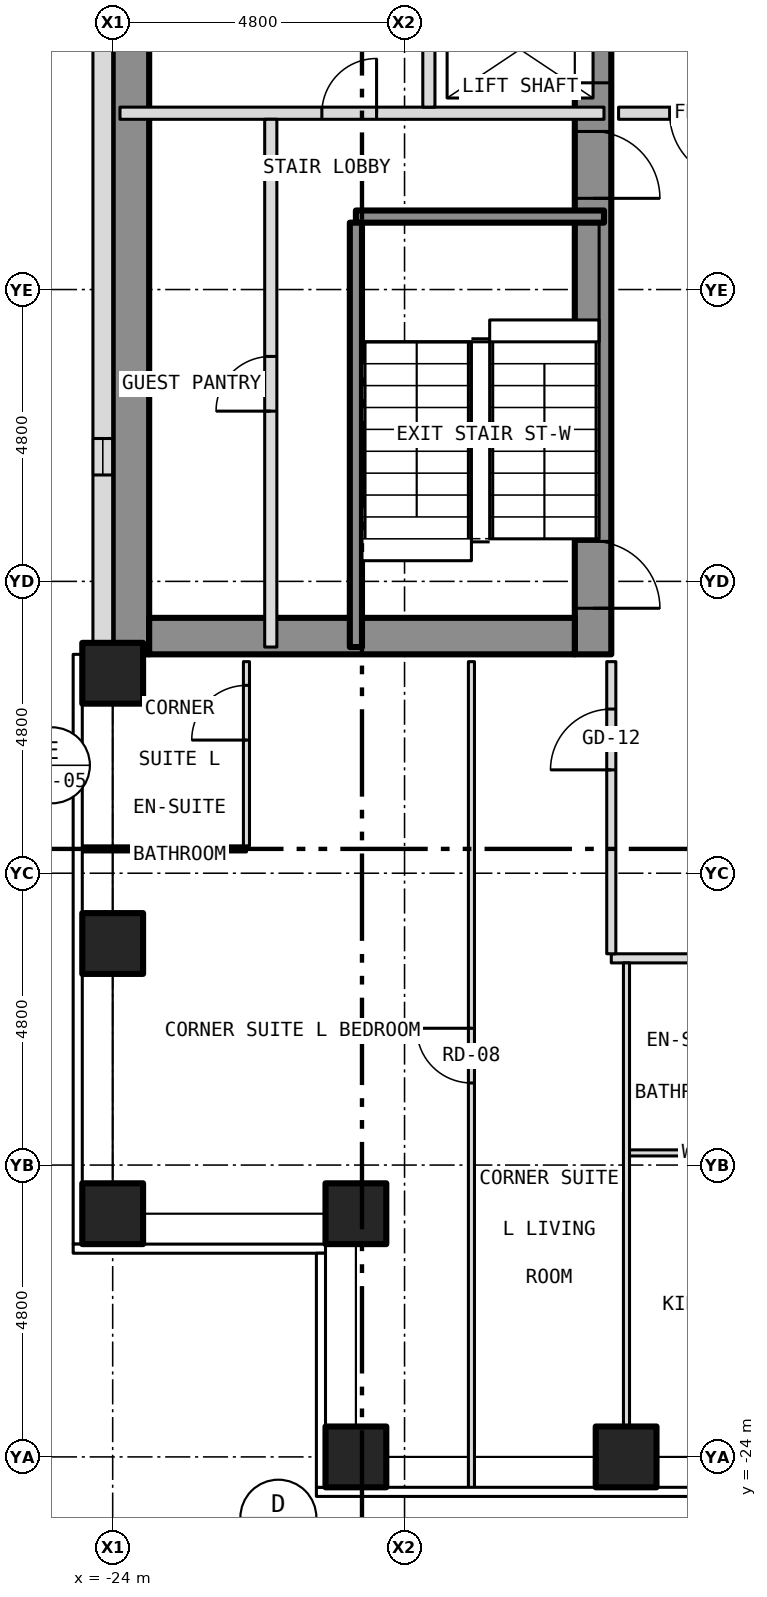
"""IFC4 building model, lengths in metres.
Left out: names, types, materials, properties, quantities, classifications, styles, units other than length and angle.
Written with IfcOpenShell. Run it as: python <this file> out.ifc"""

import sys

from ifc_helpers import new_model, si_unit, direction, frame, frame_2d, origin, origin_2d, place, context, subcontext, project, spatial, rectangle, hollow_rectangle, extrude, element, fill, save


model = new_model("IFC4")
c1 = context("Model", 3, precision=1e-05, world=origin(), true_north=direction((0.0, 1.0)))
c2 = subcontext(c1, "Body", "Model", "MODEL_VIEW")
j1 = project(units=[si_unit("LENGTHUNIT", "METRE"), si_unit("PLANEANGLEUNIT", "RADIAN")], contexts=[c1])
p1 = place(None, origin())
s1 = spatial("IfcSite", under=j1, at=p1, CompositionType="ELEMENT")
p2 = place(p1, origin())
s2 = spatial("IfcBuilding", under=s1, at=p2, CompositionType="ELEMENT")
p3 = place(p2, frame((0.0, 0.0, 49.5)))
s3 = spatial("IfcBuildingStorey", under=s2, at=p3, CompositionType="ELEMENT", Elevation=49.5)
for number, where, z_axis, x_axis in (
    (1, (-20.0, -24.0, -0.15), (0.0, 0.0, 1.0), (1.0, 0.0, 0.0)),
    (2, (-15.556, -24.0, -0.15), (0.0, 0.0, 1.0), (1.0, 0.0, 0.0)),
    (3, (-24.0, -20.0, -0.15), (0.0, 0.0, 1.0), (1.0, 0.0, 0.0)),
    (4, (-24.0, -15.556, -0.15), (0.0, 0.0, 1.0), (1.0, 0.0, 0.0)),
    (5, (-24.0, -11.111, -0.15), (0.0, 0.0, 1.0), (1.0, 0.0, 0.0)),
    (6, (-20.0, -20.0, -0.15), (0.0, 0.0, 1.0), (1.0, 0.0, 0.0)),
):
    element("IfcColumn", number, at=place(p3, frame(where, z_axis=z_axis, x_axis=x_axis)), inside=s3, PredefinedType="COLUMN", context=c2, shape_type="SweptSolid", body=[
        extrude(hollow_rectangle(XDim=1.0, YDim=1.0, WallThickness=0.06, at=origin_2d()), origin(), (0.0, 0.0, 1.0), 3.5),
    ])
p4 = place(p3, frame((-16.1, -10.8, 0.0), z_axis=(0.0, 0.0, 1.0), x_axis=(0.0, 1.0, 0.0)))
e7 = element("IfcWall", 7, at=p4, inside=s3, PredefinedType="SHEAR", context=c2, shape_type="SweptSolid", body=[
    extrude(rectangle(XDim=21.6, YDim=0.6, at=frame_2d((10.8, 0.0))), origin(), (0.0, 0.0, 1.0), 3.25),
])
p5 = place(p4, frame((9.4, 0.0, 0.0)))
e8 = element("IfcOpeningElement", 8, at=p5, cuts=e7, PredefinedType="OPENING", context=c2, shape_type="SweptSolid", body=[
    extrude(rectangle(XDim=1.1, YDim=2.1, at=frame_2d((0.55, 1.05))), frame((0.0, 0.312, 0.0), z_axis=(0.0, -1.0, 0.0), x_axis=(1.0, 0.0, 0.0)), (0.0, 0.0, 1.0), 0.624),
])
p6 = place(p4, frame((11.5, 0.0, 0.0)))
e9 = element("IfcOpeningElement", 9, at=p6, cuts=e7, PredefinedType="OPENING", context=c2, shape_type="SweptSolid", body=[
    extrude(rectangle(XDim=1.1, YDim=2.1, at=frame_2d((0.55, 1.05))), frame((0.0, 0.312, 0.0), z_axis=(0.0, -1.0, 0.0), x_axis=(1.0, 0.0, 0.0)), (0.0, 0.0, 1.0), 0.624),
])
p7 = place(p4, frame((13.6, 0.0, 0.0)))
e10 = element("IfcOpeningElement", 10, at=p7, cuts=e7, PredefinedType="OPENING", context=c2, shape_type="SweptSolid", body=[
    extrude(rectangle(XDim=1.1, YDim=2.1, at=frame_2d((0.55, 1.05))), frame((0.0, 0.312, 0.0), z_axis=(0.0, -1.0, 0.0), x_axis=(1.0, 0.0, 0.0)), (0.0, 0.0, 1.0), 0.624),
])
p8 = place(p4, frame((15.7, 0.0, 0.0)))
e11 = element("IfcOpeningElement", 11, at=p8, cuts=e7, PredefinedType="OPENING", context=c2, shape_type="SweptSolid", body=[
    extrude(rectangle(XDim=1.1, YDim=2.1, at=frame_2d((0.55, 1.05))), frame((0.0, 0.312, 0.0), z_axis=(0.0, -1.0, 0.0), x_axis=(1.0, 0.0, 0.0)), (0.0, 0.0, 1.0), 0.624),
])
p9 = place(p4, frame((17.8, 0.0, 0.0)))
e12 = element("IfcOpeningElement", 12, at=p9, cuts=e7, PredefinedType="OPENING", context=c2, shape_type="SweptSolid", body=[
    extrude(rectangle(XDim=1.1, YDim=2.1, at=frame_2d((0.55, 1.05))), frame((0.0, 0.312, 0.0), z_axis=(0.0, -1.0, 0.0), x_axis=(1.0, 0.0, 0.0)), (0.0, 0.0, 1.0), 0.624),
])
p10 = place(p4, frame((0.758, 0.0, 0.0)))
e13 = element("IfcOpeningElement", 13, at=p10, cuts=e7, PredefinedType="OPENING", context=c2, shape_type="SweptSolid", body=[
    extrude(rectangle(XDim=1.1, YDim=2.1, at=frame_2d((0.55, 1.05))), frame((0.0, 0.312, 0.0), z_axis=(0.0, -1.0, 0.0), x_axis=(1.0, 0.0, 0.0)), (0.0, 0.0, 1.0), 0.624),
])
p11 = place(p4, frame((7.5, 0.0, 0.0)))
e14 = element("IfcOpeningElement", 14, at=p11, cuts=e7, PredefinedType="OPENING", context=c2, shape_type="SweptSolid", body=[
    extrude(rectangle(XDim=1.1, YDim=2.1, at=frame_2d((0.55, 1.05))), frame((0.0, 0.312, 0.0), z_axis=(0.0, -1.0, 0.0), x_axis=(1.0, 0.0, 0.0)), (0.0, 0.0, 1.0), 0.624),
])
p12 = place(p3, frame((-23.7, -10.8, 0.0), z_axis=(0.0, 0.0, 1.0), x_axis=(0.0, 1.0, 0.0)))
e15 = element("IfcWall", 15, at=p12, inside=s3, PredefinedType="SHEAR", context=c2, shape_type="SweptSolid", body=[
    extrude(rectangle(XDim=21.6, YDim=0.6, at=frame_2d((10.8, 0.0))), origin(), (0.0, 0.0, 1.0), 3.25),
])
p13 = place(p3, frame((-23.4, -10.5, 0.0), z_axis=(0.0, 0.0, 1.0), x_axis=(1.0, 0.0, 0.0)))
e16 = element("IfcWall", 16, at=p13, inside=s3, PredefinedType="SHEAR", context=c2, shape_type="SweptSolid", body=[
    extrude(rectangle(XDim=7.0, YDim=0.6, at=frame_2d((3.5, 0.0))), origin(), (0.0, 0.0, 1.0), 3.25),
])
p14 = place(p3, frame((-24.163, 10.8, 0.0), z_axis=(0.0, 0.0, 1.0), x_axis=(0.0, -1.0, 0.0)))
e17 = element("IfcWall", 17, at=p14, inside=s3, PredefinedType="SOLIDWALL", context=c2, shape_type="SweptSolid", body=[
    extrude(rectangle(XDim=21.6, YDim=0.325, at=frame_2d((10.8, 0.0))), origin(), (0.0, 0.0, 1.0), 3.5),
])
p15 = place(p14, frame((18.05, 0.0, 1.0)))
e18 = element("IfcOpeningElement", 18, at=p15, cuts=e17, PredefinedType="OPENING", context=c2, shape_type="SweptSolid", body=[
    extrude(rectangle(XDim=0.6, YDim=1.5, at=frame_2d((0.3, 0.75))), frame((0.0, 0.175, 0.0), z_axis=(0.0, -1.0, 0.0), x_axis=(1.0, 0.0, 0.0)), (0.0, 0.0, 1.0), 0.349),
])
p16 = place(p3, frame((-15.55, -19.0, 0.0), z_axis=(0.0, 0.0, 1.0), x_axis=(1.0, 0.0, 0.0)))
e19 = element("IfcWall", 19, at=p16, inside=s3, PredefinedType="PARTITIONING", context=c2, shape_type="SweptSolid", body=[
    extrude(rectangle(XDim=2.2, YDim=0.1, at=frame_2d((1.1, 0.0))), origin(), (0.0, 0.0, 1.0), 3.35),
])
p17 = place(p3, frame((-15.8, -15.8, 0.0), z_axis=(0.0, 0.0, 1.0), x_axis=(1.0, 0.0, 0.0)))
e20 = element("IfcWall", 20, at=p17, inside=s3, PredefinedType="PARTITIONING", context=c2, shape_type="SweptSolid", body=[
    extrude(rectangle(XDim=31.6, YDim=0.15, at=frame_2d((15.8, 0.0))), origin(), (0.0, 0.0, 1.0), 3.35),
])
p18 = place(p17, frame((3.067, 0.0, 0.0)))
e21 = element("IfcOpeningElement", 21, at=p18, cuts=e20, PredefinedType="OPENING", context=c2, shape_type="SweptSolid", body=[
    extrude(rectangle(XDim=1.0, YDim=2.1, at=frame_2d((0.5, 1.05))), frame((0.0, 0.087, 0.0), z_axis=(0.0, -1.0, 0.0), x_axis=(1.0, 0.0, 0.0)), (0.0, 0.0, 1.0), 0.174),
])
p19 = place(p17, frame((5.311, 0.0, 0.0)))
e22 = element("IfcOpeningElement", 22, at=p19, cuts=e20, PredefinedType="OPENING", context=c2, shape_type="SweptSolid", body=[
    extrude(rectangle(XDim=1.0, YDim=2.1, at=frame_2d((0.5, 1.05))), frame((0.0, 0.087, 0.0), z_axis=(0.0, -1.0, 0.0), x_axis=(1.0, 0.0, 0.0)), (0.0, 0.0, 1.0), 0.174),
])
p20 = place(p17, frame((9.756, 0.0, 0.0)))
e23 = element("IfcOpeningElement", 23, at=p20, cuts=e20, PredefinedType="OPENING", context=c2, shape_type="SweptSolid", body=[
    extrude(rectangle(XDim=1.0, YDim=2.1, at=frame_2d((0.5, 1.05))), frame((0.0, 0.087, 0.0), z_axis=(0.0, -1.0, 0.0), x_axis=(1.0, 0.0, 0.0)), (0.0, 0.0, 1.0), 0.174),
])
p21 = place(p17, frame((15.311, 0.0, 0.0)))
e24 = element("IfcOpeningElement", 24, at=p21, cuts=e20, PredefinedType="OPENING", context=c2, shape_type="SweptSolid", body=[
    extrude(rectangle(XDim=1.0, YDim=2.1, at=frame_2d((0.5, 1.05))), frame((0.0, 0.087, 0.0), z_axis=(0.0, -1.0, 0.0), x_axis=(1.0, 0.0, 0.0)), (0.0, 0.0, 1.0), 0.174),
])
p22 = place(p17, frame((22.245, 0.0, 0.0)))
e25 = element("IfcOpeningElement", 25, at=p22, cuts=e20, PredefinedType="OPENING", context=c2, shape_type="SweptSolid", body=[
    extrude(rectangle(XDim=1.0, YDim=2.1, at=frame_2d((0.5, 1.05))), frame((0.0, 0.087, 0.0), z_axis=(0.0, -1.0, 0.0), x_axis=(1.0, 0.0, 0.0)), (0.0, 0.0, 1.0), 0.174),
])
p23 = place(p3, frame((-24.53, -14.0, 0.0), z_axis=(0.0, 0.0, 1.0), x_axis=(1.0, 0.0, 0.0)))
e26 = element("IfcWall", 26, at=p23, inside=s3, PredefinedType="PARTITIONING", context=c2, shape_type="SweptSolid", body=[
    extrude(rectangle(XDim=2.73, YDim=0.1, at=frame_2d((1.365, 0.0))), origin(), (0.0, 0.0, 1.0), 3.35),
])
p24 = place(p3, frame((-20.0, -3.6, 0.0), z_axis=(0.0, 0.0, 1.0), x_axis=(1.0, 0.0, 0.0)))
e27 = element("IfcWall", 27, at=p24, inside=s3, PredefinedType="SHEAR", context=c2, shape_type="SweptSolid", body=[
    extrude(rectangle(XDim=4.08, YDim=0.2, at=frame_2d((2.04, 0.0))), origin(), (0.0, 0.0, 1.0), 3.25),
])
p25 = place(p3, frame((-23.88, -1.9, 0.0), z_axis=(0.0, 0.0, 1.0), x_axis=(1.0, 0.0, 0.0)))
e28 = element("IfcWall", 28, at=p25, inside=s3, PredefinedType="PARTITIONING", context=c2, shape_type="SweptSolid", body=[
    extrude(rectangle(XDim=7.96, YDim=0.2, at=frame_2d((3.98, 0.0))), origin(), (0.0, 0.0, 1.0), 3.25),
])
p26 = place(p25, frame((3.32, 0.0, 0.0)))
e29 = element("IfcOpeningElement", 29, at=p26, cuts=e28, PredefinedType="OPENING", context=c2, shape_type="SweptSolid", body=[
    extrude(rectangle(XDim=0.9, YDim=2.1, at=frame_2d((0.45, 1.05))), frame((0.0, 0.112, 0.0), z_axis=(0.0, -1.0, 0.0), x_axis=(1.0, 0.0, 0.0)), (0.0, 0.0, 1.0), 0.224),
])
p27 = place(p3, frame((-15.68, -1.9, 0.0), z_axis=(0.0, 0.0, 1.0), x_axis=(1.0, 0.0, 0.0)))
e30 = element("IfcWall", 30, at=p27, inside=s3, PredefinedType="PARTITIONING", context=c2, shape_type="SweptSolid", body=[
    extrude(rectangle(XDim=3.28, YDim=0.2, at=frame_2d((1.64, 0.0))), origin(), (0.0, 0.0, 1.0), 3.35),
])
p28 = place(p27, frame((0.84, 0.0, 0.0)))
e31 = element("IfcOpeningElement", 31, at=p28, cuts=e30, PredefinedType="OPENING", context=c2, shape_type="SweptSolid", body=[
    extrude(rectangle(XDim=1.1, YDim=2.1, at=frame_2d((0.55, 1.05))), frame((0.0, 0.112, 0.0), z_axis=(0.0, -1.0, 0.0), x_axis=(1.0, 0.0, 0.0)), (0.0, 0.0, 1.0), 0.224),
])
p29 = place(p3, frame((-21.8, -13.95, 0.0), z_axis=(0.0, 0.0, 1.0), x_axis=(0.0, 1.0, 0.0)))
e32 = element("IfcWall", 32, at=p29, inside=s3, PredefinedType="PARTITIONING", context=c2, shape_type="SweptSolid", body=[
    extrude(rectangle(XDim=3.03, YDim=0.1, at=frame_2d((1.515, 0.0))), origin(), (0.0, 0.0, 1.0), 3.35),
])
p30 = place(p29, frame((1.74, 0.0, 0.0)))
e33 = element("IfcOpeningElement", 33, at=p30, cuts=e32, PredefinedType="OPENING", context=c2, shape_type="SweptSolid", body=[
    extrude(rectangle(XDim=0.9, YDim=2.1, at=frame_2d((0.45, 1.05))), frame((0.0, 0.062, 0.0), z_axis=(0.0, -1.0, 0.0), x_axis=(1.0, 0.0, 0.0)), (0.0, 0.0, 1.0), 0.124),
])
p31 = place(p3, frame((-21.4, -10.68, 0.0), z_axis=(0.0, 0.0, 1.0), x_axis=(0.0, 1.0, 0.0)))
e34 = element("IfcWall", 34, at=p31, inside=s3, PredefinedType="PARTITIONING", context=c2, shape_type="SweptSolid", body=[
    extrude(rectangle(XDim=8.68, YDim=0.2, at=frame_2d((4.34, 0.0))), origin(), (0.0, 0.0, 1.0), 3.25),
])
p32 = place(p31, frame((3.88, 0.0, 0.0)))
e35 = element("IfcOpeningElement", 35, at=p32, cuts=e34, PredefinedType="OPENING", context=c2, shape_type="SweptSolid", body=[
    extrude(rectangle(XDim=0.9, YDim=2.1, at=frame_2d((0.45, 1.05))), frame((0.0, 0.112, 0.0), z_axis=(0.0, -1.0, 0.0), x_axis=(1.0, 0.0, 0.0)), (0.0, 0.0, 1.0), 0.224),
])
p33 = place(p3, frame((-20.0, -10.68, 0.0), z_axis=(0.0, 0.0, 1.0), x_axis=(0.0, 1.0, 0.0)))
e36 = element("IfcWall", 36, at=p33, inside=s3, PredefinedType="SHEAR", context=c2, shape_type="SweptSolid", body=[
    extrude(rectangle(XDim=6.98, YDim=0.2, at=frame_2d((3.49, 0.0))), origin(), (0.0, 0.0, 1.0), 3.25),
])
p34 = place(p3, frame((-18.8, -1.8, 0.0), z_axis=(0.0, 0.0, 1.0), x_axis=(0.0, 1.0, 0.0)))
e37 = element("IfcWall", 37, at=p34, inside=s3, PredefinedType="PARTITIONING", context=c2, shape_type="SweptSolid", body=[
    extrude(rectangle(XDim=6.15, YDim=0.2, at=frame_2d((3.075, 0.0))), origin(), (0.0, 0.0, 1.0), 3.25),
])
p35 = place(p3, frame((-18.1, -24.53, 0.0), z_axis=(0.0, 0.0, 1.0), x_axis=(0.0, 1.0, 0.0)))
e38 = element("IfcWall", 38, at=p35, inside=s3, PredefinedType="PARTITIONING", context=c2, shape_type="SweptSolid", body=[
    extrude(rectangle(XDim=13.61, YDim=0.1, at=frame_2d((6.805, 0.0))), origin(), (0.0, 0.0, 1.0), 3.35),
])
p36 = place(p35, frame((6.68, 0.0, 0.0)))
e39 = element("IfcOpeningElement", 39, at=p36, cuts=e38, PredefinedType="OPENING", context=c2, shape_type="SweptSolid", body=[
    extrude(rectangle(XDim=0.9, YDim=2.1, at=frame_2d((0.45, 1.05))), frame((0.0, 0.062, 0.0), z_axis=(0.0, -1.0, 0.0), x_axis=(1.0, 0.0, 0.0)), (0.0, 0.0, 1.0), 0.124),
])
p37 = place(p3, frame((-15.8, -15.725, 0.0), z_axis=(0.0, 0.0, 1.0), x_axis=(0.0, 1.0, 0.0)))
e40 = element("IfcWall", 40, at=p37, inside=s3, PredefinedType="PARTITIONING", context=c2, shape_type="SweptSolid", body=[
    extrude(rectangle(XDim=4.805, YDim=0.15, at=frame_2d((2.403, 0.0))), origin(), (0.0, 0.0, 1.0), 3.35),
])
p38 = place(p37, frame((3.025, 0.0, 0.0)))
e41 = element("IfcOpeningElement", 41, at=p38, cuts=e40, PredefinedType="OPENING", context=c2, shape_type="SweptSolid", body=[
    extrude(rectangle(XDim=1.0, YDim=2.1, at=frame_2d((0.5, 1.05))), frame((0.0, 0.087, 0.0), z_axis=(0.0, -1.0, 0.0), x_axis=(1.0, 0.0, 0.0)), (0.0, 0.0, 1.0), 0.174),
])
p39 = place(p3, frame((-15.55, -23.88, 0.0), z_axis=(0.0, 0.0, 1.0), x_axis=(0.0, 1.0, 0.0)))
e42 = element("IfcWall", 42, at=p39, inside=s3, PredefinedType="PARTITIONING", context=c2, shape_type="SweptSolid", body=[
    extrude(rectangle(XDim=8.005, YDim=0.1, at=frame_2d((4.002, 0.0))), origin(), (0.0, 0.0, 1.0), 3.35),
])
p40 = place(p15, origin())
e43 = element("IfcWindow", 43, at=p40, inside=s3, PartitioningType="SINGLE_PANEL", PredefinedType="WINDOW", context=c2, shape_type="SweptSolid", body=[
    extrude(rectangle(XDim=0.6, YDim=1.5, at=frame_2d((0.3, 0.75))), frame((0.0, -0.073, 0.0), z_axis=(0.0, -1.0, 0.0), x_axis=(1.0, 0.0, 0.0)), (0.0, 0.0, 1.0), 0.06),
])
fill(e18, e43)
p41 = place(p5, origin())
e44 = element("IfcDoor", 44, at=p41, inside=s3, OperationType="SLIDING_TO_LEFT", PredefinedType="DOOR", context=c2, shape_type="SweptSolid", body=[
    extrude(rectangle(XDim=1.1, YDim=2.1, at=frame_2d((0.55, 1.05))), frame((0.0, 0.025, 0.0), z_axis=(0.0, -1.0, 0.0), x_axis=(1.0, 0.0, 0.0)), (0.0, 0.0, 1.0), 0.05),
])
fill(e8, e44)
p42 = place(p10, origin())
e45 = element("IfcDoor", 45, at=p42, inside=s3, OperationType="SINGLE_SWING_LEFT", PredefinedType="DOOR", context=c2, shape_type="SweptSolid", body=[
    extrude(rectangle(XDim=1.1, YDim=2.1, at=frame_2d((0.55, 1.05))), frame((0.0, 0.025, 0.0), z_axis=(0.0, -1.0, 0.0), x_axis=(1.0, 0.0, 0.0)), (0.0, 0.0, 1.0), 0.05),
])
fill(e13, e45)
p43 = place(p11, origin())
e46 = element("IfcDoor", 46, at=p43, inside=s3, OperationType="SINGLE_SWING_LEFT", PredefinedType="DOOR", context=c2, shape_type="SweptSolid", body=[
    extrude(rectangle(XDim=1.1, YDim=2.1, at=frame_2d((0.55, 1.05))), frame((0.0, 0.025, 0.0), z_axis=(0.0, -1.0, 0.0), x_axis=(1.0, 0.0, 0.0)), (0.0, 0.0, 1.0), 0.05),
])
fill(e14, e46)
p44 = place(p32, origin())
e47 = element("IfcDoor", 47, at=p44, inside=s3, OperationType="SINGLE_SWING_LEFT", PredefinedType="DOOR", context=c2, shape_type="SweptSolid", body=[
    extrude(rectangle(XDim=0.9, YDim=2.1, at=frame_2d((0.45, 1.05))), frame((0.0, 0.025, 0.0), z_axis=(0.0, -1.0, 0.0), x_axis=(1.0, 0.0, 0.0)), (0.0, 0.0, 1.0), 0.05),
])
fill(e35, e47)
p45 = place(p26, origin())
e48 = element("IfcDoor", 48, at=p45, inside=s3, OperationType="SINGLE_SWING_RIGHT", PredefinedType="DOOR", context=c2, shape_type="SweptSolid", body=[
    extrude(rectangle(XDim=0.9, YDim=2.1, at=frame_2d((0.45, 1.05))), frame((0.0, 0.025, 0.0), z_axis=(0.0, -1.0, 0.0), x_axis=(1.0, 0.0, 0.0)), (0.0, 0.0, 1.0), 0.05),
])
fill(e29, e48)
p46 = place(p28, origin())
e49 = element("IfcDoor", 49, at=p46, inside=s3, OperationType="SINGLE_SWING_RIGHT", PredefinedType="DOOR", context=c2, shape_type="SweptSolid", body=[
    extrude(rectangle(XDim=1.1, YDim=2.1, at=frame_2d((0.55, 1.05))), frame((0.0, 0.025, 0.0), z_axis=(0.0, -1.0, 0.0), x_axis=(1.0, 0.0, 0.0)), (0.0, 0.0, 1.0), 0.05),
])
fill(e31, e49)
p47 = place(p38, origin())
e50 = element("IfcDoor", 50, at=p47, inside=s3, OperationType="SINGLE_SWING_LEFT", PredefinedType="DOOR", context=c2, shape_type="SweptSolid", body=[
    extrude(rectangle(XDim=1.0, YDim=2.1, at=frame_2d((0.5, 1.05))), frame((0.0, 0.025, 0.0), z_axis=(0.0, -1.0, 0.0), x_axis=(1.0, 0.0, 0.0)), (0.0, 0.0, 1.0), 0.05),
])
fill(e41, e50)
p48 = place(p36, origin())
e51 = element("IfcDoor", 51, at=p48, inside=s3, OperationType="SINGLE_SWING_RIGHT", PredefinedType="DOOR", context=c2, shape_type="SweptSolid", body=[
    extrude(rectangle(XDim=0.9, YDim=2.1, at=frame_2d((0.45, 1.05))), frame((0.0, 0.025, 0.0), z_axis=(0.0, -1.0, 0.0), x_axis=(1.0, 0.0, 0.0)), (0.0, 0.0, 1.0), 0.05),
])
fill(e39, e51)
p49 = place(p30, origin())
e52 = element("IfcDoor", 52, at=p49, inside=s3, OperationType="SINGLE_SWING_LEFT", PredefinedType="DOOR", context=c2, shape_type="SweptSolid", body=[
    extrude(rectangle(XDim=0.9, YDim=2.1, at=frame_2d((0.45, 1.05))), frame((0.0, 0.025, 0.0), z_axis=(0.0, -1.0, 0.0), x_axis=(1.0, 0.0, 0.0)), (0.0, 0.0, 1.0), 0.05),
])
fill(e33, e52)
save(model, sys.argv[1])
